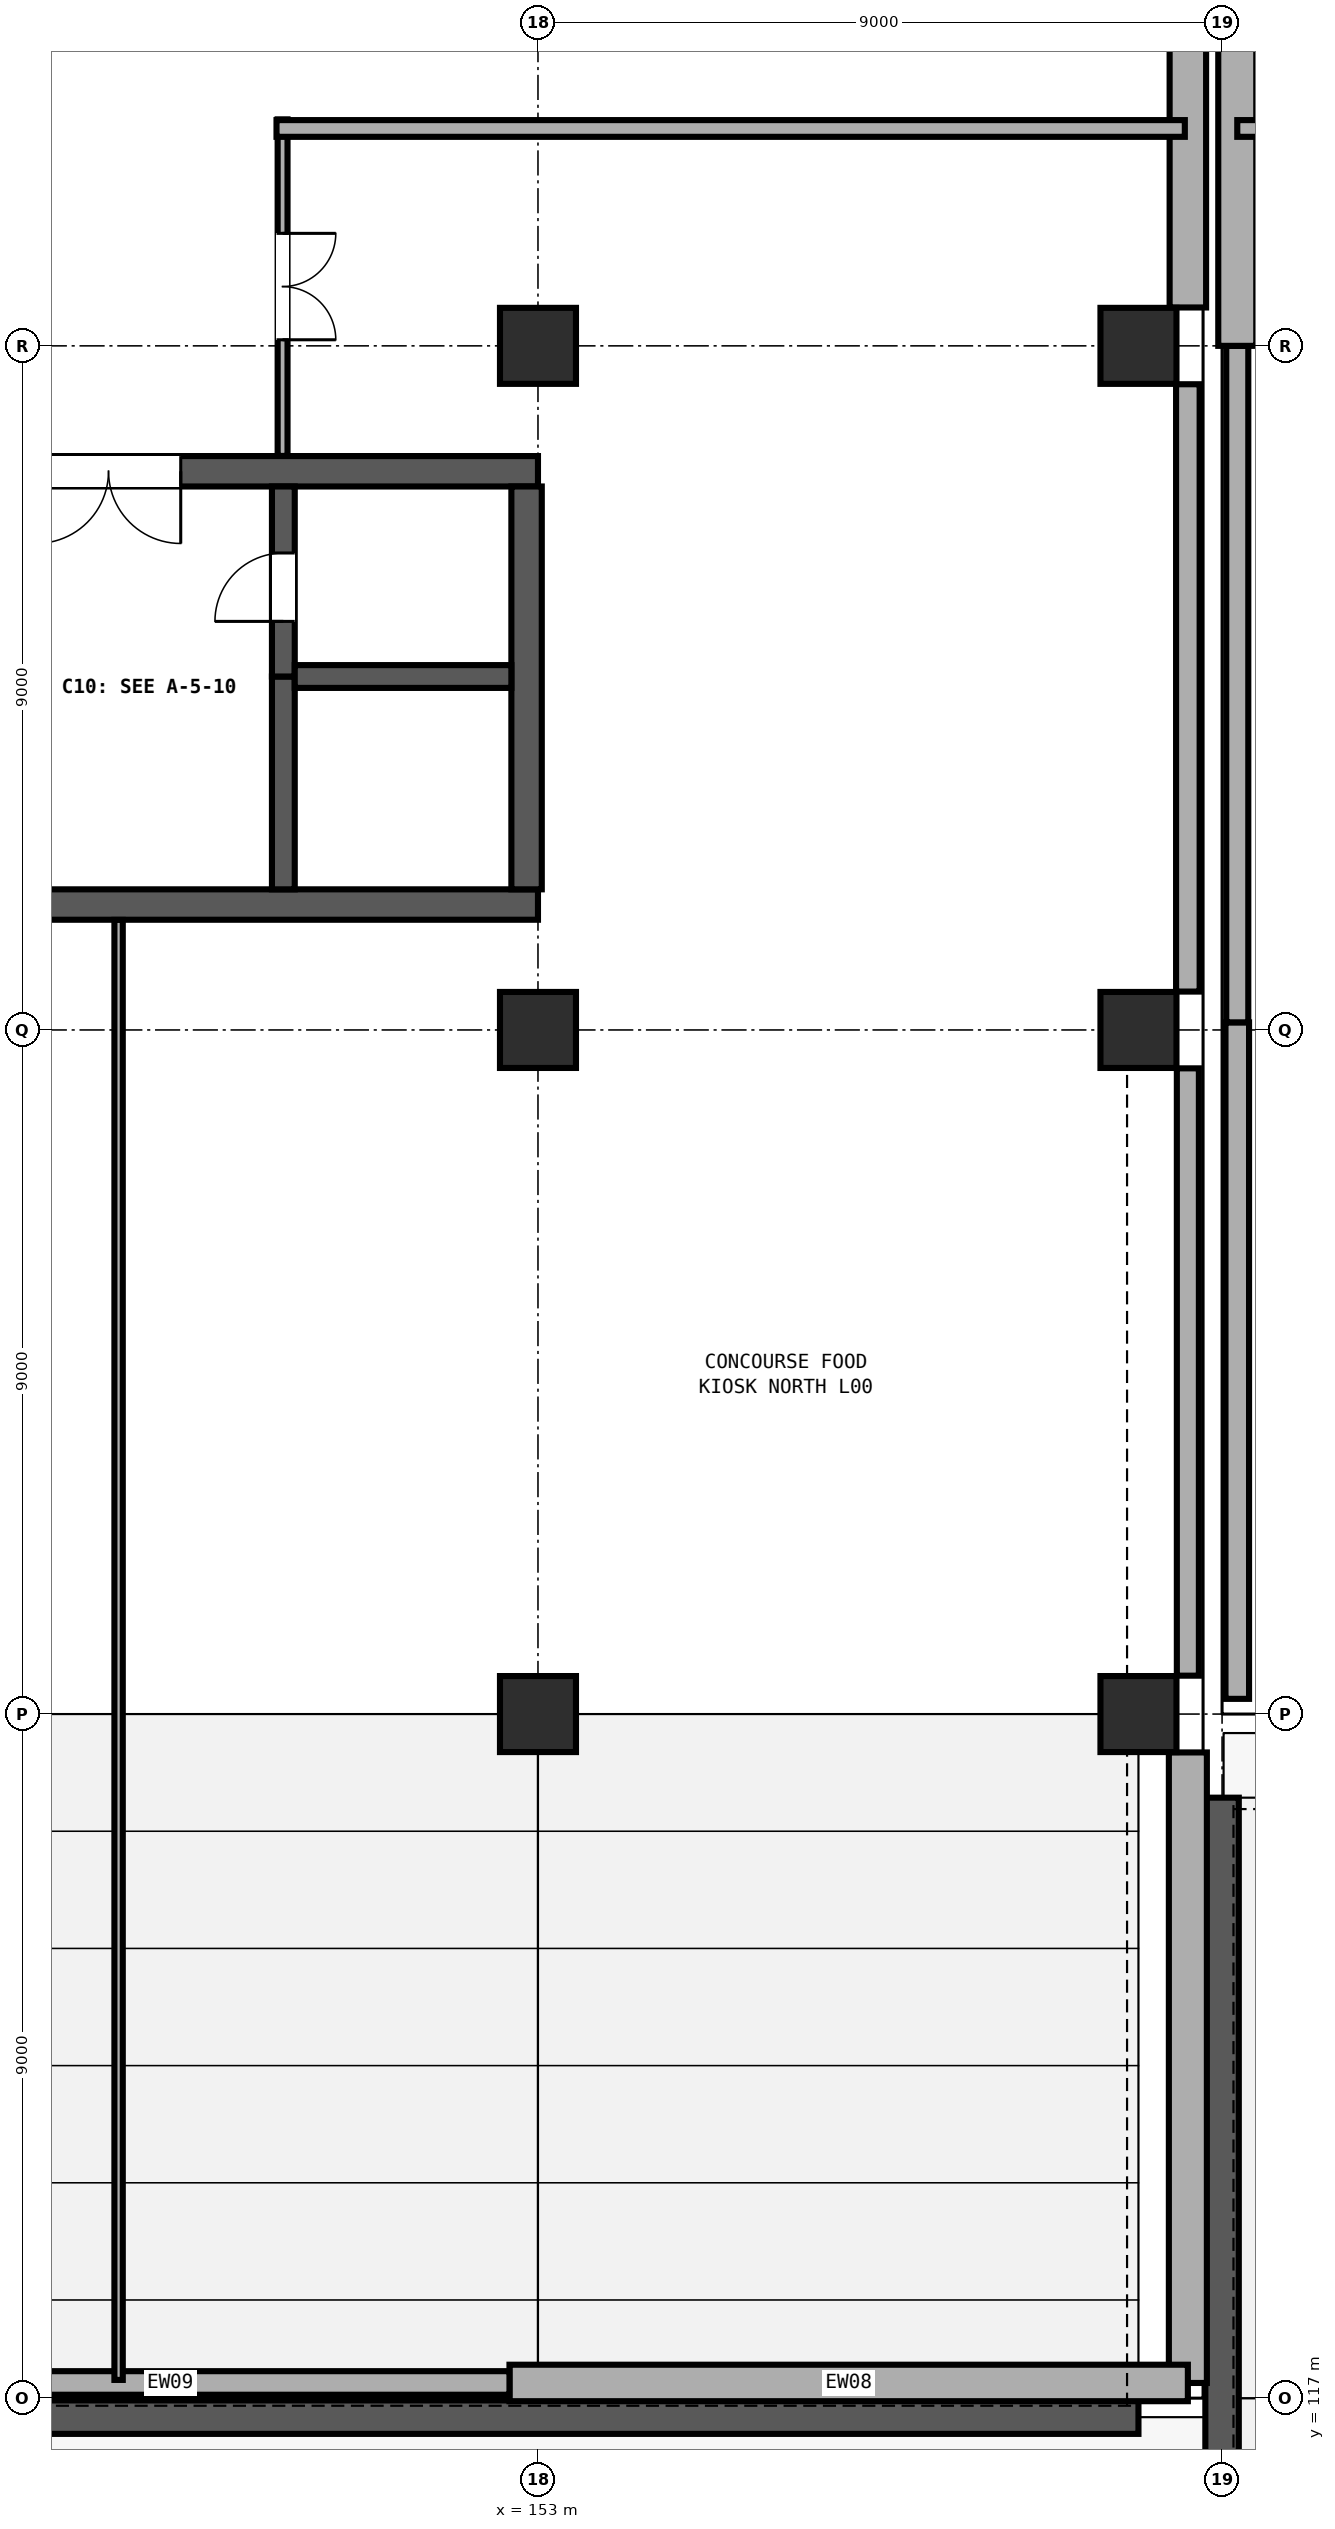
"""IFC4 building model, lengths in metres.
Left out: names, types, materials, properties, quantities, classifications, styles, units other than length and angle.
Written with IfcOpenShell. Run it as: python <this file> out.ifc"""

import sys

from ifc_helpers import new_model, si_unit, direction, frame, frame_2d, origin, origin_2d, place, context, subcontext, project, spatial, rectangle, extrude, element, fill, save


model = new_model("IFC4")
c1 = context("Model", 3, precision=1e-05, world=origin(), true_north=direction((0.0, 1.0)))
c2 = subcontext(c1, "Body", "Model", "MODEL_VIEW")
j1 = project(units=[si_unit("LENGTHUNIT", "METRE"), si_unit("PLANEANGLEUNIT", "RADIAN")], contexts=[c1])
p1 = place(None, origin())
s1 = spatial("IfcSite", under=j1, at=p1, CompositionType="ELEMENT")
p2 = place(p1, origin())
s2 = spatial("IfcBuilding", under=s1, at=p2, CompositionType="ELEMENT")
p3 = place(p2, origin())
s3 = spatial("IfcBuildingStorey", under=s2, at=p3, CompositionType="ELEMENT", Elevation=0.0)
for number, where, z_axis, x_axis in (
    (1, (153.0, 126.0, 0.0), (0.0, 0.0, 1.0), (1.0, 0.0, 0.0)),
    (2, (153.0, 135.0, 0.0), (0.0, 0.0, 1.0), (1.0, 0.0, 0.0)),
    (3, (153.0, 144.0, 0.0), (0.0, 0.0, 1.0), (1.0, 0.0, 0.0)),
    (4, (160.9, 126.0, 0.0), (0.0, 0.0, 1.0), (1.0, 0.0, 0.0)),
    (5, (160.9, 135.0, 0.0), (0.0, 0.0, 1.0), (1.0, 0.0, 0.0)),
    (6, (160.9, 144.0, 0.0), (0.0, 0.0, 1.0), (1.0, 0.0, 0.0)),
):
    element("IfcColumn", number, at=place(p3, frame(where, z_axis=z_axis, x_axis=x_axis)), inside=s3, PredefinedType="COLUMN", context=c2, shape_type="SweptSolid", body=[
        extrude(rectangle(XDim=1.0, YDim=1.0, at=origin_2d()), origin(), (0.0, 0.0, 1.0), 4.8),
    ])
p4 = place(p3, frame((162.0, 124.9, 0.0), z_axis=(0.0, 0.0, 1.0), x_axis=(0.0, -1.0, 0.0)))
e7 = element("IfcWall", 7, at=p4, inside=s3, PredefinedType="SOLIDWALL", context=c2, shape_type="SweptSolid", body=[
    extrude(rectangle(XDim=87.8, YDim=0.44, at=frame_2d((43.9, 0.0))), origin(), (0.0, 0.0, 1.0), 0.9),
])
p5 = place(p3, frame((160.9, 116.75, 0.0), z_axis=(0.0, 0.0, 1.0), x_axis=(-1.0, 0.0, 0.0)))
e8 = element("IfcWall", 8, at=p5, inside=s3, PredefinedType="SOLIDWALL", context=c2, shape_type="SweptSolid", body=[
    extrude(rectangle(XDim=105.8, YDim=0.44, at=frame_2d((52.9, 0.0))), origin(), (0.0, 0.0, 1.0), 0.9),
])
p6 = place(p3, frame((135.0, 136.65, 0.0), z_axis=(0.0, 0.0, 1.0), x_axis=(1.0, 0.0, 0.0)))
e9 = element("IfcWall", 9, at=p6, inside=s3, PredefinedType="SHEAR", context=c2, shape_type="SweptSolid", body=[
    extrude(rectangle(XDim=18.0, YDim=0.4, at=frame_2d((9.0, 0.0))), origin(), (0.0, 0.0, 1.0), 4.5),
])
p7 = place(p3, frame((153.0, 142.35, 0.0), z_axis=(0.0, 0.0, 1.0), x_axis=(-1.0, 0.0, 0.0)))
e10 = element("IfcWall", 10, at=p7, inside=s3, PredefinedType="SHEAR", context=c2, shape_type="SweptSolid", body=[
    extrude(rectangle(XDim=18.0, YDim=0.4, at=frame_2d((9.0, 0.0))), origin(), (0.0, 0.0, 1.0), 4.5),
])
p8 = place(p7, frame((4.7, 0.0, 0.0)))
e11 = element("IfcOpeningElement", 11, at=p8, cuts=e10, PredefinedType="OPENING", context=c2, shape_type="SweptSolid", body=[
    extrude(rectangle(XDim=1.9, YDim=2.25, at=frame_2d((0.95, 1.125))), frame((0.0, 0.21, 0.0), z_axis=(0.0, -1.0, 0.0), x_axis=(1.0, 0.0, 0.0)), (0.0, 0.0, 1.0), 0.42),
])
p9 = place(p3, frame((152.85, 136.85, 0.0), z_axis=(0.0, 0.0, 1.0), x_axis=(0.0, 1.0, 0.0)))
e12 = element("IfcWall", 12, at=p9, inside=s3, PredefinedType="SHEAR", context=c2, shape_type="SweptSolid", body=[
    extrude(rectangle(XDim=5.3, YDim=0.4, at=frame_2d((2.65, 0.0))), origin(), (0.0, 0.0, 1.0), 4.5),
])
p10 = place(p3, frame((149.65, 136.85, 0.0), z_axis=(0.0, 0.0, 1.0), x_axis=(0.0, 1.0, 0.0)))
e13 = element("IfcWall", 13, at=p10, inside=s3, PredefinedType="SHEAR", context=c2, shape_type="SweptSolid", body=[
    extrude(rectangle(XDim=2.8, YDim=0.3, at=frame_2d((1.4, 0.0))), origin(), (0.0, 0.0, 1.0), 4.5),
])
p11 = place(p3, frame((149.65, 139.65, 0.0), z_axis=(0.0, 0.0, 1.0), x_axis=(0.0, 1.0, 0.0)))
e14 = element("IfcWall", 14, at=p11, inside=s3, PredefinedType="SHEAR", context=c2, shape_type="SweptSolid", body=[
    extrude(rectangle(XDim=2.5, YDim=0.3, at=frame_2d((1.25, 0.0))), origin(), (0.0, 0.0, 1.0), 4.5),
])
p12 = place(p11, frame((0.725, 0.0, 0.0)))
e15 = element("IfcOpeningElement", 15, at=p12, cuts=e14, PredefinedType="OPENING", context=c2, shape_type="SweptSolid", body=[
    extrude(rectangle(XDim=0.9, YDim=2.1, at=frame_2d((0.45, 1.05))), frame((0.0, 0.16, 0.0), z_axis=(0.0, -1.0, 0.0), x_axis=(1.0, 0.0, 0.0)), (0.0, 0.0, 1.0), 0.32),
])
p13 = place(p3, frame((149.8, 139.65, 0.0), z_axis=(0.0, 0.0, 1.0), x_axis=(1.0, 0.0, 0.0)))
e16 = element("IfcWall", 16, at=p13, inside=s3, PredefinedType="SHEAR", context=c2, shape_type="SweptSolid", body=[
    extrude(rectangle(XDim=2.85, YDim=0.3, at=frame_2d((1.425, 0.0))), origin(), (0.0, 0.0, 1.0), 4.5),
])
p14 = place(p3, frame((161.55, 152.495, 0.0), z_axis=(0.0, 0.0, 1.0), x_axis=(0.0, -1.0, 0.0)))
e17 = element("IfcWall", 17, at=p14, inside=s3, PredefinedType="SOLIDWALL", context=c2, shape_type="SweptSolid", body=[
    extrude(rectangle(XDim=7.99, YDim=0.48, at=frame_2d((3.995, 0.0))), origin(), (0.0, 0.0, 1.0), 3.28),
])
p15 = place(p3, frame((161.55, 143.495, 0.0), z_axis=(0.0, 0.0, 1.0), x_axis=(0.0, -1.0, 0.0)))
e18 = element("IfcWall", 18, at=p15, inside=s3, PredefinedType="SOLIDWALL", context=c2, shape_type="SweptSolid", body=[
    extrude(rectangle(XDim=7.99, YDim=0.31, at=frame_2d((3.995, 0.0))), origin(), (0.0, 0.0, 1.0), 3.28),
])
p16 = place(p3, frame((161.55, 134.495, 0.0), z_axis=(0.0, 0.0, 1.0), x_axis=(0.0, -1.0, 0.0)))
e19 = element("IfcWall", 19, at=p16, inside=s3, PredefinedType="SOLIDWALL", context=c2, shape_type="SweptSolid", body=[
    extrude(rectangle(XDim=7.99, YDim=0.29, at=frame_2d((3.995, 0.0))), origin(), (0.0, 0.0, 1.0), 3.28),
])
p17 = place(p3, frame((161.55, 125.495, 0.0), z_axis=(0.0, 0.0, 1.0), x_axis=(0.0, -1.0, 0.0)))
e20 = element("IfcWall", 20, at=p17, inside=s3, PredefinedType="SOLIDWALL", context=c2, shape_type="SweptSolid", body=[
    extrude(rectangle(XDim=8.295, YDim=0.5, at=frame_2d((4.147, 0.0))), origin(), (0.0, 0.0, 1.0), 3.28),
])
p18 = place(p3, frame((161.55, 117.2, 0.0), z_axis=(0.0, 0.0, 1.0), x_axis=(-1.0, 0.0, 0.0)))
e21 = element("IfcWall", 21, at=p18, inside=s3, PredefinedType="SOLIDWALL", context=c2, shape_type="SweptSolid", body=[
    extrude(rectangle(XDim=8.925, YDim=0.48, at=frame_2d((4.462, 0.0))), origin(), (0.0, 0.0, 1.0), 3.28),
])
p19 = place(p3, frame((152.625, 117.2, 0.0), z_axis=(0.0, 0.0, 1.0), x_axis=(-1.0, 0.0, 0.0)))
e22 = element("IfcWall", 22, at=p19, inside=s3, PredefinedType="SOLIDWALL", context=c2, shape_type="SweptSolid", body=[
    extrude(rectangle(XDim=8.925, YDim=0.31, at=frame_2d((4.462, 0.0))), origin(), (0.0, 0.0, 1.0), 3.28),
])
p20 = place(p3, frame((162.2, 126.2, 0.0), z_axis=(0.0, 0.0, 1.0), x_axis=(0.0, 1.0, 0.0)))
e23 = element("IfcWall", 23, at=p20, inside=s3, PredefinedType="SOLIDWALL", context=c2, shape_type="SweptSolid", body=[
    extrude(rectangle(XDim=8.9, YDim=0.31, at=frame_2d((4.45, 0.0))), origin(), (0.0, 0.0, 1.0), 3.28),
])
p21 = place(p3, frame((162.2, 135.1, 0.0), z_axis=(0.0, 0.0, 1.0), x_axis=(0.0, 1.0, 0.0)))
e24 = element("IfcWall", 24, at=p21, inside=s3, PredefinedType="SOLIDWALL", context=c2, shape_type="SweptSolid", body=[
    extrude(rectangle(XDim=8.9, YDim=0.29, at=frame_2d((4.45, 0.0))), origin(), (0.0, 0.0, 1.0), 3.28),
])
p22 = place(p3, frame((162.2, 144.0, 0.0), z_axis=(0.0, 0.0, 1.0), x_axis=(0.0, 1.0, 0.0)))
e25 = element("IfcWall", 25, at=p22, inside=s3, PredefinedType="SOLIDWALL", context=c2, shape_type="SweptSolid", body=[
    extrude(rectangle(XDim=8.9, YDim=0.5, at=frame_2d((4.45, 0.0))), origin(), (0.0, 0.0, 1.0), 3.28),
])
p23 = place(p3, frame((149.64, 146.98, 0.0), z_axis=(0.0, 0.0, 1.0), x_axis=(0.0, -1.0, 0.0)))
e26 = element("IfcWall", 26, at=p23, inside=s3, PredefinedType="PARTITIONING", context=c2, shape_type="SweptSolid", body=[
    extrude(rectangle(XDim=4.428, YDim=0.13, at=frame_2d((2.214, 0.0))), origin(), (0.0, 0.0, 1.0), 3.28),
])
p24 = place(p23, frame((1.5, 0.0, 0.0)))
e27 = element("IfcOpeningElement", 27, at=p24, cuts=e26, PredefinedType="OPENING", context=c2, shape_type="SweptSolid", body=[
    extrude(rectangle(XDim=1.4, YDim=2.15, at=frame_2d((0.7, 1.075))), frame((0.0, 0.075, 0.0), z_axis=(0.0, -1.0, 0.0), x_axis=(1.0, 0.0, 0.0)), (0.0, 0.0, 1.0), 0.15),
])
p25 = place(p3, frame((147.482, 117.24, 0.0), z_axis=(0.0, 0.0, 1.0), x_axis=(0.0, 1.0, 0.0)))
e28 = element("IfcWall", 28, at=p25, inside=s3, PredefinedType="PARTITIONING", context=c2, shape_type="SweptSolid", body=[
    extrude(rectangle(XDim=19.208, YDim=0.11, at=frame_2d((9.604, 0.0))), origin(), (0.0, 0.0, 1.0), 3.28),
])
p26 = place(p3, frame((149.56, 146.86, 0.0), z_axis=(0.0, 0.0, 1.0), x_axis=(1.0, 0.0, 0.0)))
e29 = element("IfcWall", 29, at=p26, inside=s3, PredefinedType="PARTITIONING", context=c2, shape_type="SweptSolid", body=[
    extrude(rectangle(XDim=11.95, YDim=0.22, at=frame_2d((5.975, 0.0))), origin(), (0.0, 0.0, 1.0), 3.28),
])
p27 = place(p3, frame((175.0, 146.86, 0.0), z_axis=(0.0, 0.0, 1.0), x_axis=(-1.0, 0.0, 0.0)))
e30 = element("IfcWall", 30, at=p27, inside=s3, PredefinedType="PARTITIONING", context=c2, shape_type="SweptSolid", body=[
    extrude(rectangle(XDim=12.8, YDim=0.22, at=frame_2d((6.4, 0.0))), origin(), (0.0, 0.0, 1.0), 3.28),
])
p28 = place(p27, frame((5.7, 0.0, 0.0)))
e31 = element("IfcOpeningElement", 31, at=p28, cuts=e30, PredefinedType="OPENING", context=c2, shape_type="SweptSolid", body=[
    extrude(rectangle(XDim=1.4, YDim=2.15, at=frame_2d((0.7, 1.075))), frame((0.0, 0.12, 0.0), z_axis=(0.0, -1.0, 0.0), x_axis=(1.0, 0.0, 0.0)), (0.0, 0.0, 1.0), 0.24),
])
p29 = place(p12, origin())
e32 = element("IfcDoor", 32, at=p29, inside=s3, OperationType="SINGLE_SWING_LEFT", PredefinedType="DOOR", context=c2, shape_type="SweptSolid", body=[
    extrude(rectangle(XDim=0.9, YDim=2.1, at=frame_2d((0.45, 1.05))), frame((0.0, 0.025, 0.0), z_axis=(0.0, -1.0, 0.0), x_axis=(1.0, 0.0, 0.0)), (0.0, 0.0, 1.0), 0.05),
])
fill(e15, e32)
p30 = place(p8, origin())
e33 = element("IfcDoor", 33, at=p30, inside=s3, OperationType="DOUBLE_DOOR_SINGLE_SWING", PredefinedType="DOOR", context=c2, shape_type="SweptSolid", body=[
    extrude(rectangle(XDim=1.9, YDim=2.25, at=frame_2d((0.95, 1.125))), frame((0.0, 0.025, 0.0), z_axis=(0.0, -1.0, 0.0), x_axis=(1.0, 0.0, 0.0)), (0.0, 0.0, 1.0), 0.05),
])
fill(e11, e33)
p31 = place(p24, origin())
e34 = element("IfcDoor", 34, at=p31, inside=s3, OperationType="DOUBLE_DOOR_SINGLE_SWING", PredefinedType="DOOR", context=c2, shape_type="SweptSolid", body=[
    extrude(rectangle(XDim=1.4, YDim=2.15, at=frame_2d((0.7, 1.075))), frame((0.0, 0.025, 0.0), z_axis=(0.0, -1.0, 0.0), x_axis=(1.0, 0.0, 0.0)), (0.0, 0.0, 1.0), 0.05),
])
fill(e27, e34)
save(model, sys.argv[1])
